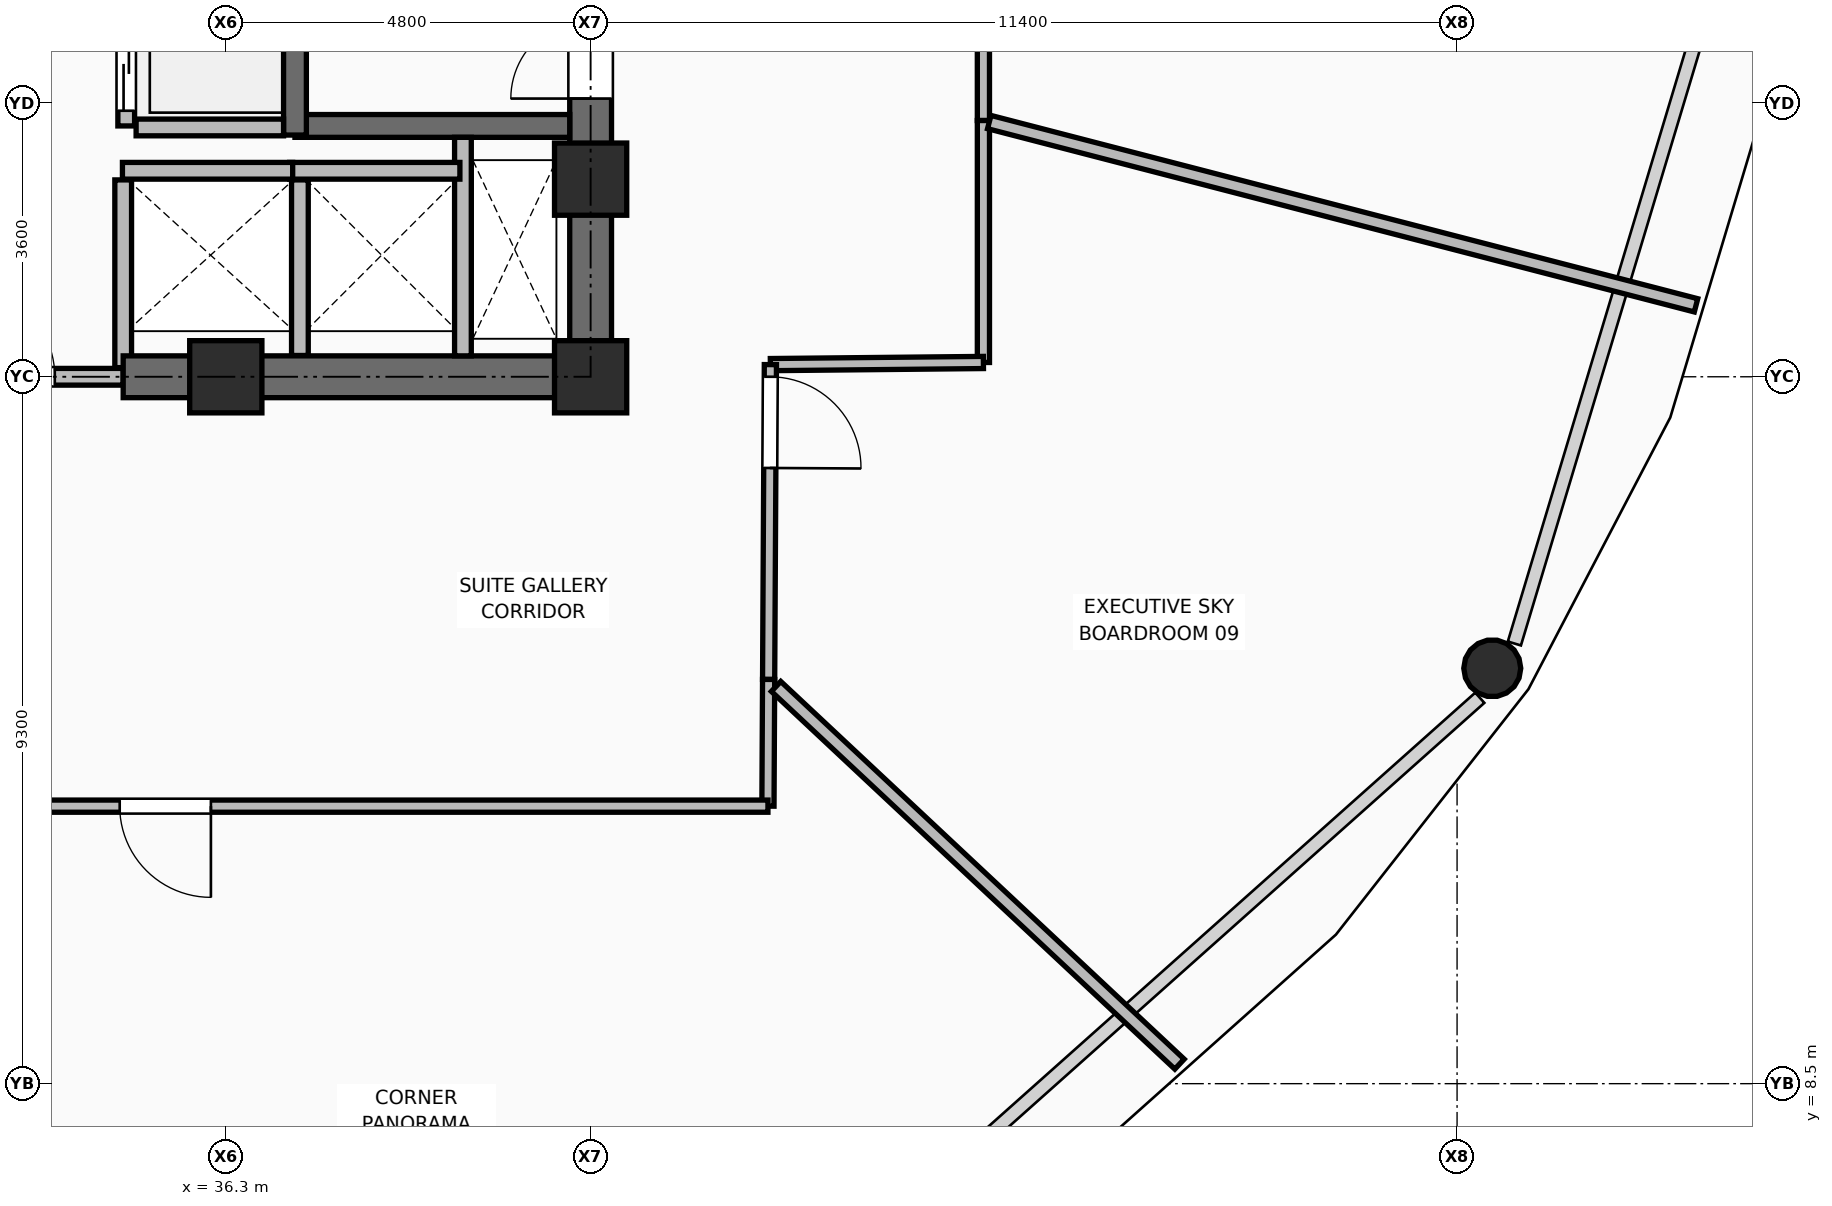
"""IFC4 building model, lengths in metres.
Left out: names, types, materials, properties, quantities, classifications, styles, units other than length and angle.
Written with IfcOpenShell. Run it as: python <this file> out.ifc"""

import sys

from ifc_helpers import new_model, si_unit, direction, frame, frame_2d, origin, origin_2d, place, context, subcontext, project, spatial, rectangle, hollow_circle, extrude, element, fill, save


model = new_model("IFC4")
c1 = context("Model", 3, precision=1e-05, world=origin(), true_north=direction((0.0, 1.0)))
c2 = subcontext(c1, "Body", "Model", "MODEL_VIEW")
j1 = project(units=[si_unit("LENGTHUNIT", "METRE"), si_unit("PLANEANGLEUNIT", "RADIAN")], contexts=[c1])
p1 = place(None, origin())
s1 = spatial("IfcSite", under=j1, at=p1, CompositionType="ELEMENT")
p2 = place(p1, origin())
s2 = spatial("IfcBuilding", under=s1, at=p2, CompositionType="ELEMENT")
p3 = place(p2, frame((0.0, 0.0, 160.95)))
s3 = spatial("IfcBuildingStorey", under=s2, at=p3, CompositionType="ELEMENT", Elevation=160.95)
for number, where, z_axis, x_axis in (
    (1, (36.3, 17.8, 0.0), (0.0, 0.0, 1.0), (1.0, 0.0, 0.0)),
    (2, (41.1, 17.8, 0.0), (0.0, 0.0, 1.0), (1.0, 0.0, 0.0)),
    (3, (41.1, 20.4, 0.0), (0.0, 0.0, 1.0), (1.0, 0.0, 0.0)),
):
    element("IfcColumn", number, at=place(p3, frame(where, z_axis=z_axis, x_axis=x_axis)), inside=s3, PredefinedType="COLUMN", context=c2, shape_type="SweptSolid", body=[
        extrude(rectangle(XDim=0.95, YDim=0.95, at=origin_2d()), origin(), (0.0, 0.0, 1.0), 3.75),
    ])
p4 = place(p3, frame((52.963, 13.965, 0.0), z_axis=(-0.059769728806, 0.030976548947, 0.997731443292), x_axis=(-0.460139651685, -0.887846552591, 0.0)))
e4 = element("IfcColumn", 4, at=p4, inside=s3, PredefinedType="COLUMN", context=c2, shape_type="SweptSolid", body=[
    extrude(hollow_circle(Radius=0.375, WallThickness=0.035, at=origin_2d()), origin(), (0.0, 0.0, 1.0), 3.578),
])
p5 = place(p3, frame((34.95, 17.92, 0.0), z_axis=(0.0, 0.0, 1.0), x_axis=(0.0, 1.0, 0.0)))
e5 = element("IfcWall", 5, at=p5, inside=s3, PredefinedType="PARTITIONING", context=c2, shape_type="SweptSolid", body=[
    extrude(rectangle(XDim=2.47, YDim=0.22, at=frame_2d((1.235, 0.0))), origin(), (0.0, 0.0, 1.0), 3.006),
])
p6 = place(p3, frame((37.275, 18.08, 0.0), z_axis=(0.0, 0.0, 1.0), x_axis=(0.0, 1.0, 0.0)))
e6 = element("IfcWall", 6, at=p6, inside=s3, PredefinedType="PARTITIONING", context=c2, shape_type="SweptSolid", body=[
    extrude(rectangle(XDim=2.31, YDim=0.22, at=frame_2d((1.155, 0.0))), origin(), (0.0, 0.0, 1.0), 3.545),
])
p7 = place(p3, frame((32.45, 17.8, 0.0), z_axis=(0.0, 0.0, 1.0), x_axis=(1.0, 0.0, 0.0)))
e7 = element("IfcWall", 7, at=p7, inside=s3, PredefinedType="PARTITIONING", context=c2, shape_type="SweptSolid", body=[
    extrude(rectangle(XDim=2.5, YDim=0.22, at=frame_2d((1.25, 0.0))), origin(), (0.0, 0.0, 1.0), 3.006),
])
p8 = place(p7, frame((0.4, 0.0, 0.0)))
e8 = element("IfcOpeningElement", 8, at=p8, cuts=e7, PredefinedType="OPENING", context=c2, shape_type="SweptSolid", body=[
    extrude(rectangle(XDim=1.2, YDim=2.1, at=frame_2d((0.6, 1.05))), frame((0.0, 0.12, 0.0), z_axis=(0.0, -1.0, 0.0), x_axis=(1.0, 0.0, 0.0)), (0.0, 0.0, 1.0), 0.24),
])
p9 = place(p3, frame((34.95, 17.8, 0.0), z_axis=(0.0, 0.0, 1.0), x_axis=(1.0, 0.0, 0.0)))
e9 = element("IfcWall", 9, at=p9, inside=s3, PredefinedType="SHEAR", context=c2, shape_type="SweptSolid", body=[
    extrude(rectangle(XDim=6.425, YDim=0.55, at=frame_2d((3.212, 0.0))), origin(), (0.0, 0.0, 1.0), 3.57),
])
p10 = place(p3, frame((41.1, 18.075, 0.0), z_axis=(0.0, 0.0, 1.0), x_axis=(0.0, 1.0, 0.0)))
e10 = element("IfcWall", 10, at=p10, inside=s3, PredefinedType="SHEAR", context=c2, shape_type="SweptSolid", body=[
    extrude(rectangle(XDim=14.1, YDim=0.55, at=frame_2d((7.05, 0.0))), origin(), (0.0, 0.0, 1.0), 3.57),
])
p11 = place(p10, frame((3.385, 0.0, 0.0)))
e11 = element("IfcOpeningElement", 11, at=p11, cuts=e10, PredefinedType="OPENING", context=c2, shape_type="SweptSolid", body=[
    extrude(rectangle(XDim=1.05, YDim=2.1, at=frame_2d((0.525, 1.05))), frame((0.0, 0.285, 0.0), z_axis=(0.0, -1.0, 0.0), x_axis=(1.0, 0.0, 0.0)), (0.0, 0.0, 1.0), 0.57),
])
p12 = place(p3, frame((37.21, 21.1, 0.0), z_axis=(0.0, 0.0, 1.0), x_axis=(1.0, 0.0, 0.0)))
e12 = element("IfcWall", 12, at=p12, inside=s3, PredefinedType="SHEAR", context=c2, shape_type="SweptSolid", body=[
    extrude(rectangle(XDim=3.615, YDim=0.3, at=frame_2d((1.808, 0.0))), origin(), (0.0, 0.0, 1.0), 3.57),
])
p13 = place(p3, frame((37.21, 20.98, 0.0), z_axis=(0.0, 0.0, 1.0), x_axis=(0.0, 1.0, 0.0)))
e13 = element("IfcWall", 13, at=p13, inside=s3, PredefinedType="SHEAR", context=c2, shape_type="SweptSolid", body=[
    extrude(rectangle(XDim=7.99, YDim=0.3, at=frame_2d((3.995, 0.0))), origin(), (0.0, 0.0, 1.0), 3.57),
])
p14 = place(p3, frame((39.42, 18.075, 0.0), z_axis=(0.0, 0.0, 1.0), x_axis=(0.0, 1.0, 0.0)))
e14 = element("IfcWall", 14, at=p14, inside=s3, PredefinedType="PARTITIONING", context=c2, shape_type="SweptSolid", body=[
    extrude(rectangle(XDim=2.875, YDim=0.22, at=frame_2d((1.438, 0.0))), origin(), (0.0, 0.0, 1.0), 3.55),
])
for number, where, z_axis, x_axis in (
    (15, (37.14, 20.51, 0.0), (0.0, 0.0, 1.0), (1.0, 0.0, 0.0)),
    (16, (34.94, 20.51, 0.0), (0.0, 0.0, 1.0), (1.0, 0.0, 0.0)),
):
    element("IfcWall", number, at=place(p3, frame(where, z_axis=z_axis, x_axis=x_axis)), inside=s3, PredefinedType="PARTITIONING", context=c2, shape_type="SweptSolid", body=[
        extrude(rectangle(XDim=2.24, YDim=0.22, at=frame_2d((1.12, 0.0))), origin(), (0.0, 0.0, 1.0), 3.55),
    ])
p15 = place(p3, frame((34.99, 21.1, 0.0), z_axis=(0.0, 0.0, 1.0), x_axis=(0.0, 1.0, 0.0)))
e17 = element("IfcWall", 17, at=p15, inside=s3, PredefinedType="PARTITIONING", context=c2, shape_type="SweptSolid", body=[
    extrude(rectangle(XDim=1.5, YDim=0.22, at=frame_2d((0.75, 0.0))), origin(), (0.0, 0.0, 1.0), 3.55),
])
p16 = place(p15, frame((0.2, 0.0, 0.0)))
e18 = element("IfcOpeningElement", 18, at=p16, cuts=e17, PredefinedType="OPENING", context=c2, shape_type="SweptSolid", body=[
    extrude(rectangle(XDim=1.1, YDim=2.2, at=frame_2d((0.55, 1.1))), frame((0.0, 0.12, 0.0), z_axis=(0.0, -1.0, 0.0), x_axis=(1.0, 0.0, 0.0)), (0.0, 0.0, 1.0), 0.24),
])
p17 = place(p3, frame((35.12, 21.08, 0.0), z_axis=(0.0, 0.0, 1.0), x_axis=(1.0, 0.0, 0.0)))
e19 = element("IfcWall", 19, at=p17, inside=s3, PredefinedType="PARTITIONING", context=c2, shape_type="SweptSolid", body=[
    extrude(rectangle(XDim=1.94, YDim=0.22, at=frame_2d((0.97, 0.0))), origin(), (0.0, 0.0, 1.0), 3.55),
])
p18 = place(p3, frame((46.267, 28.329, 0.0), z_axis=(0.0, 0.0, 1.0), x_axis=(0.000136425647, -0.999999990694, 0.0)))
e20 = element("IfcWall", 20, at=p18, inside=s3, PredefinedType="PARTITIONING", context=c2, shape_type="SweptSolid", body=[
    extrude(rectangle(XDim=7.158, YDim=0.16, at=frame_2d((3.579, 0.0))), origin(), (0.0, 0.0, 1.0), 3.006),
])
p19 = place(p18, frame((2.979, 0.0, 0.0)))
e21 = element("IfcOpeningElement", 21, at=p19, cuts=e20, PredefinedType="OPENING", context=c2, shape_type="SweptSolid", body=[
    extrude(rectangle(XDim=1.2, YDim=2.1, at=frame_2d((0.6, 1.05))), frame((0.0, 0.09, 0.0), z_axis=(0.0, -1.0, 0.0), x_axis=(1.0, 0.0, 0.0)), (0.0, 0.0, 1.0), 0.18),
])
p20 = place(p3, frame((46.268, 21.171, 0.0), z_axis=(0.0, 0.0, 1.0), x_axis=(0.0, -1.0, 0.0)))
e22 = element("IfcWall", 22, at=p20, inside=s3, PredefinedType="PARTITIONING", context=c2, shape_type="SweptSolid", body=[
    extrude(rectangle(XDim=3.183, YDim=0.16, at=frame_2d((1.591, 0.0))), origin(), (0.0, 0.0, 1.0), 3.55),
])
p21 = place(p3, frame((46.268, 17.988, 0.0), z_axis=(0.0, 0.0, 1.0), x_axis=(-0.999949838147, -0.010016046632, 0.0)))
e23 = element("IfcWall", 23, at=p21, inside=s3, PredefinedType="PARTITIONING", context=c2, shape_type="SweptSolid", body=[
    extrude(rectangle(XDim=2.803, YDim=0.16, at=frame_2d((1.402, 0.0))), origin(), (0.0, 0.0, 1.0), 3.55),
])
p22 = place(p3, frame((43.465, 17.96, 0.0), z_axis=(0.0, 0.0, 1.0), x_axis=(-0.005599676426, -0.999984321689, 0.0)))
e24 = element("IfcWall", 24, at=p22, inside=s3, PredefinedType="PARTITIONING", context=c2, shape_type="SweptSolid", body=[
    extrude(rectangle(XDim=4.142, YDim=0.16, at=frame_2d((2.071, 0.0))), origin(), (0.0, 0.0, 1.0), 3.006),
])
p23 = place(p22, frame((0.16, 0.0, 0.0)))
e25 = element("IfcOpeningElement", 25, at=p23, cuts=e24, PredefinedType="OPENING", context=c2, shape_type="SweptSolid", body=[
    extrude(rectangle(XDim=1.2, YDim=2.1, at=frame_2d((0.6, 1.05))), frame((0.0, 0.09, 0.0), z_axis=(0.0, -1.0, 0.0), x_axis=(1.0, 0.0, 0.0)), (0.0, 0.0, 1.0), 0.18),
])
p24 = place(p3, frame((43.442, 13.818, 0.0), z_axis=(0.0, 0.0, 1.0), x_axis=(-0.005271562423, -0.999986105218, 0.0)))
e26 = element("IfcWall", 26, at=p24, inside=s3, PredefinedType="PARTITIONING", context=c2, shape_type="SweptSolid", body=[
    extrude(rectangle(XDim=1.667, YDim=0.16, at=frame_2d((0.833, 0.0))), origin(), (0.0, 0.0, 1.0), 3.55),
])
p25 = place(p3, frame((43.433, 12.151, 0.0), z_axis=(0.0, 0.0, 1.0), x_axis=(-1.0, 0.0, 0.0)))
e27 = element("IfcWall", 27, at=p25, inside=s3, PredefinedType="PARTITIONING", context=c2, shape_type="SweptSolid", body=[
    extrude(rectangle(XDim=16.008, YDim=0.16, at=frame_2d((8.004, 0.0))), origin(), (0.0, 0.0, 1.0), 3.006),
])
p26 = place(p25, frame((7.329, 0.0, 0.0)))
e28 = element("IfcOpeningElement", 28, at=p26, cuts=e27, PredefinedType="OPENING", context=c2, shape_type="SweptSolid", body=[
    extrude(rectangle(XDim=1.2, YDim=2.1, at=frame_2d((0.6, 1.05))), frame((0.0, 0.09, 0.0), z_axis=(0.0, -1.0, 0.0), x_axis=(1.0, 0.0, 0.0)), (0.0, 0.0, 1.0), 0.18),
])
p27 = place(p3, frame((43.54, 13.726, 0.0), z_axis=(0.0, 0.0, 1.0), x_axis=(0.730026032341, -0.683419338404, 0.0)))
e29 = element("IfcWall", 29, at=p27, inside=s3, PredefinedType="PARTITIONING", context=c2, shape_type="SweptSolid", body=[
    extrude(rectangle(XDim=7.271, YDim=0.18, at=frame_2d((3.635, 0.0))), origin(), (0.0, 0.0, 1.0), 2.852),
])
p28 = place(p3, frame((46.345, 21.151, 0.0), z_axis=(0.0, 0.0, 1.0), x_axis=(0.967996440842, -0.250963922742, 0.0)))
e30 = element("IfcWall", 30, at=p28, inside=s3, PredefinedType="PARTITIONING", context=c2, shape_type="SweptSolid", body=[
    extrude(rectangle(XDim=9.606, YDim=0.18, at=frame_2d((4.803, 0.0))), origin(), (0.0, 0.0, 1.0), 2.852),
])
p29 = place(p8, origin())
e31 = element("IfcDoor", 31, at=p29, inside=s3, OperationType="SINGLE_SWING_LEFT", PredefinedType="DOOR", context=c2, shape_type="SweptSolid", body=[
    extrude(rectangle(XDim=1.2, YDim=2.1, at=frame_2d((0.6, 1.05))), frame((0.0, 0.025, 0.0), z_axis=(0.0, -1.0, 0.0), x_axis=(1.0, 0.0, 0.0)), (0.0, 0.0, 1.0), 0.05),
])
fill(e8, e31)
p30 = place(p11, origin())
e32 = element("IfcDoor", 32, at=p30, inside=s3, OperationType="SINGLE_SWING_LEFT", PredefinedType="DOOR", context=c2, shape_type="SweptSolid", body=[
    extrude(rectangle(XDim=1.05, YDim=2.1, at=frame_2d((0.525, 1.05))), frame((0.0, 0.025, 0.0), z_axis=(0.0, -1.0, 0.0), x_axis=(1.0, 0.0, 0.0)), (0.0, 0.0, 1.0), 0.05),
])
fill(e11, e32)
p31 = place(p16, origin())
e33 = element("IfcDoor", 33, at=p31, inside=s3, OperationType="DOUBLE_DOOR_SLIDING", PredefinedType="DOOR", context=c2, shape_type="SweptSolid", body=[
    extrude(rectangle(XDim=1.1, YDim=2.2, at=frame_2d((0.55, 1.1))), frame((0.0, 0.025, 0.0), z_axis=(0.0, -1.0, 0.0), x_axis=(1.0, 0.0, 0.0)), (0.0, 0.0, 1.0), 0.05),
])
fill(e18, e33)
p32 = place(p26, origin())
e34 = element("IfcDoor", 34, at=p32, inside=s3, OperationType="SINGLE_SWING_LEFT", PredefinedType="DOOR", context=c2, shape_type="SweptSolid", body=[
    extrude(rectangle(XDim=1.2, YDim=2.1, at=frame_2d((0.6, 1.05))), frame((0.0, 0.025, 0.0), z_axis=(0.0, -1.0, 0.0), x_axis=(1.0, 0.0, 0.0)), (0.0, 0.0, 1.0), 0.05),
])
fill(e28, e34)
p33 = place(p23, origin())
e35 = element("IfcDoor", 35, at=p33, inside=s3, OperationType="SINGLE_SWING_RIGHT", PredefinedType="DOOR", context=c2, shape_type="SweptSolid", body=[
    extrude(rectangle(XDim=1.2, YDim=2.1, at=frame_2d((0.6, 1.05))), frame((0.0, 0.025, 0.0), z_axis=(0.0, -1.0, 0.0), x_axis=(1.0, 0.0, 0.0)), (0.0, 0.0, 1.0), 0.05),
])
fill(e25, e35)
save(model, sys.argv[1])
